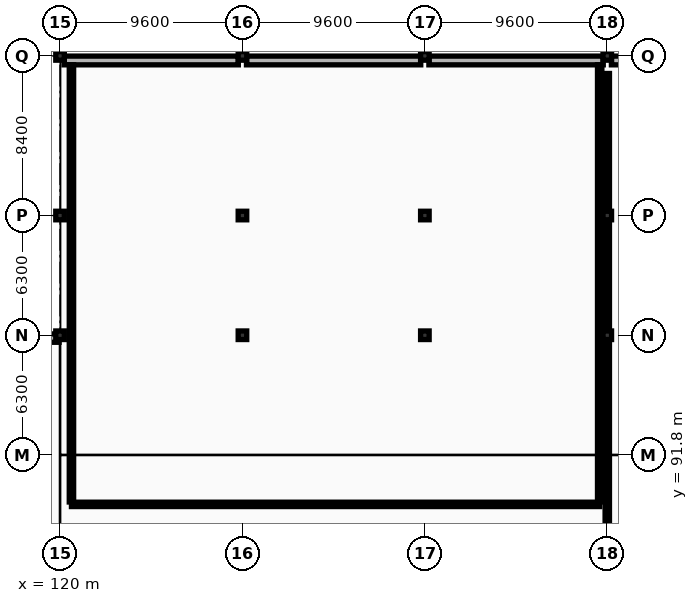
"""IFC4 building model, lengths in metres.
Left out: names, types, materials, properties, quantities, classifications, styles, units other than length and angle.
Written with IfcOpenShell. Run it as: python <this file> out.ifc"""

import sys

from ifc_helpers import new_model, si_unit, direction, frame, frame_2d, origin, origin_2d, place, context, subcontext, project, spatial, rectangle, extrude, element, fill, save


model = new_model("IFC4")
c1 = context("Model", 3, precision=1e-05, world=origin(), true_north=direction((0.0, 1.0)))
c2 = subcontext(c1, "Body", "Model", "MODEL_VIEW")
j1 = project(units=[si_unit("LENGTHUNIT", "METRE"), si_unit("PLANEANGLEUNIT", "RADIAN")], contexts=[c1])
p1 = place(None, origin())
s1 = spatial("IfcSite", under=j1, at=p1, CompositionType="ELEMENT")
p2 = place(p1, origin())
s2 = spatial("IfcBuilding", under=s1, at=p2, CompositionType="ELEMENT")
p3 = place(p2, frame((0.0, 0.0, 5.4)))
s3 = spatial("IfcBuildingStorey", under=s2, at=p3, CompositionType="ELEMENT", Elevation=5.4)
for number, where, z_axis, x_axis in (
    (1, (120.0, 98.1, 0.0), (0.0, 0.0, 1.0), (1.0, 0.0, 0.0)),
    (2, (120.0, 104.4, 0.0), (0.0, 0.0, 1.0), (1.0, 0.0, 0.0)),
    (3, (120.0, 112.8, 0.0), (0.0, 0.0, 1.0), (1.0, 0.0, 0.0)),
    (4, (129.6, 98.1, 0.0), (0.0, 0.0, 1.0), (1.0, 0.0, 0.0)),
    (5, (129.6, 104.4, 0.0), (0.0, 0.0, 1.0), (1.0, 0.0, 0.0)),
    (6, (129.6, 112.8, 0.0), (0.0, 0.0, 1.0), (1.0, 0.0, 0.0)),
    (7, (139.2, 98.1, 0.0), (0.0, 0.0, 1.0), (1.0, 0.0, 0.0)),
    (8, (139.2, 104.4, 0.0), (0.0, 0.0, 1.0), (1.0, 0.0, 0.0)),
    (9, (139.2, 112.8, 0.0), (0.0, 0.0, 1.0), (1.0, 0.0, 0.0)),
    (10, (148.8, 98.1, 0.0), (0.0, 0.0, 1.0), (1.0, 0.0, 0.0)),
    (11, (148.8, 104.4, 0.0), (0.0, 0.0, 1.0), (1.0, 0.0, 0.0)),
    (12, (148.8, 112.8, 0.0), (0.0, 0.0, 1.0), (1.0, 0.0, 0.0)),
):
    element("IfcColumn", number, at=place(p3, frame(where, z_axis=z_axis, x_axis=x_axis)), inside=s3, PredefinedType="COLUMN", context=c2, shape_type="SweptSolid", body=[
        extrude(rectangle(XDim=0.45, YDim=0.45, at=origin_2d()), origin(), (0.0, 0.0, 1.0), 4.5),
    ])
p4 = place(p3, frame((120.212, 112.56, 0.0), z_axis=(0.0, 0.0, 1.0), x_axis=(1.0, 0.0, 0.0)))
e13 = element("IfcWall", 13, at=p4, inside=s3, PredefinedType="STANDARD", context=c2, shape_type="SweptSolid", body=[
    extrude(rectangle(XDim=9.171, YDim=0.46, at=frame_2d((4.585, 0.0))), origin(), (0.0, 0.0, 1.0), 3.72),
])
p5 = place(p4, frame((2.278, 0.0, 2.15)))
e14 = element("IfcOpeningElement", 14, at=p5, cuts=e13, PredefinedType="OPENING", context=c2, shape_type="SweptSolid", body=[
    extrude(rectangle(XDim=0.85, YDim=0.9, at=frame_2d((0.425, 0.45))), frame((0.0, 0.24, 0.0), z_axis=(0.0, -1.0, 0.0), x_axis=(1.0, 0.0, 0.0)), (0.0, 0.0, 1.0), 0.48),
])
p6 = place(p4, frame((6.048, 0.0, 2.15)))
e15 = element("IfcOpeningElement", 15, at=p6, cuts=e13, PredefinedType="OPENING", context=c2, shape_type="SweptSolid", body=[
    extrude(rectangle(XDim=0.85, YDim=0.9, at=frame_2d((0.425, 0.45))), frame((0.0, 0.24, 0.0), z_axis=(0.0, -1.0, 0.0), x_axis=(1.0, 0.0, 0.0)), (0.0, 0.0, 1.0), 0.48),
])
p7 = place(p3, frame((129.812, 112.56, 0.0), z_axis=(0.0, 0.0, 1.0), x_axis=(1.0, 0.0, 0.0)))
e16 = element("IfcWall", 16, at=p7, inside=s3, PredefinedType="STANDARD", context=c2, shape_type="SweptSolid", body=[
    extrude(rectangle(XDim=9.171, YDim=0.46, at=frame_2d((4.585, 0.0))), origin(), (0.0, 0.0, 1.0), 3.72),
])
p8 = place(p7, frame((2.278, 0.0, 2.15)))
e17 = element("IfcOpeningElement", 17, at=p8, cuts=e16, PredefinedType="OPENING", context=c2, shape_type="SweptSolid", body=[
    extrude(rectangle(XDim=0.85, YDim=0.9, at=frame_2d((0.425, 0.45))), frame((0.0, 0.24, 0.0), z_axis=(0.0, -1.0, 0.0), x_axis=(1.0, 0.0, 0.0)), (0.0, 0.0, 1.0), 0.48),
])
p9 = place(p7, frame((6.048, 0.0, 2.15)))
e18 = element("IfcOpeningElement", 18, at=p9, cuts=e16, PredefinedType="OPENING", context=c2, shape_type="SweptSolid", body=[
    extrude(rectangle(XDim=0.85, YDim=0.9, at=frame_2d((0.425, 0.45))), frame((0.0, 0.24, 0.0), z_axis=(0.0, -1.0, 0.0), x_axis=(1.0, 0.0, 0.0)), (0.0, 0.0, 1.0), 0.48),
])
p10 = place(p3, frame((139.412, 112.56, 0.0), z_axis=(0.0, 0.0, 1.0), x_axis=(1.0, 0.0, 0.0)))
e19 = element("IfcWall", 19, at=p10, inside=s3, PredefinedType="STANDARD", context=c2, shape_type="SweptSolid", body=[
    extrude(rectangle(XDim=9.176, YDim=0.46, at=frame_2d((4.588, 0.0))), origin(), (0.0, 0.0, 1.0), 3.72),
])
p11 = place(p10, frame((2.278, 0.0, 2.15)))
e20 = element("IfcOpeningElement", 20, at=p11, cuts=e19, PredefinedType="OPENING", context=c2, shape_type="SweptSolid", body=[
    extrude(rectangle(XDim=0.85, YDim=0.9, at=frame_2d((0.425, 0.45))), frame((0.0, 0.24, 0.0), z_axis=(0.0, -1.0, 0.0), x_axis=(1.0, 0.0, 0.0)), (0.0, 0.0, 1.0), 0.48),
])
p12 = place(p10, frame((6.048, 0.0, 2.15)))
e21 = element("IfcOpeningElement", 21, at=p12, cuts=e19, PredefinedType="OPENING", context=c2, shape_type="SweptSolid", body=[
    extrude(rectangle(XDim=0.85, YDim=0.9, at=frame_2d((0.425, 0.45))), frame((0.0, 0.24, 0.0), z_axis=(0.0, -1.0, 0.0), x_axis=(1.0, 0.0, 0.0)), (0.0, 0.0, 1.0), 0.48),
])
p13 = place(p3, frame((149.017, 112.56, 0.0), z_axis=(0.0, 0.0, 1.0), x_axis=(1.0, 0.0, 0.0)))
e22 = element("IfcWall", 22, at=p13, inside=s3, PredefinedType="STANDARD", context=c2, shape_type="SweptSolid", body=[
    extrude(rectangle(XDim=12.766, YDim=0.46, at=frame_2d((6.383, 0.0))), origin(), (0.0, 0.0, 1.0), 3.72),
])
p14 = place(p13, frame((3.173, 0.0, 2.15)))
e23 = element("IfcOpeningElement", 23, at=p14, cuts=e22, PredefinedType="OPENING", context=c2, shape_type="SweptSolid", body=[
    extrude(rectangle(XDim=0.85, YDim=0.9, at=frame_2d((0.425, 0.45))), frame((0.0, 0.24, 0.0), z_axis=(0.0, -1.0, 0.0), x_axis=(1.0, 0.0, 0.0)), (0.0, 0.0, 1.0), 0.48),
])
p15 = place(p13, frame((8.743, 0.0, 2.15)))
e24 = element("IfcOpeningElement", 24, at=p15, cuts=e22, PredefinedType="OPENING", context=c2, shape_type="SweptSolid", body=[
    extrude(rectangle(XDim=0.85, YDim=0.9, at=frame_2d((0.425, 0.45))), frame((0.0, 0.24, 0.0), z_axis=(0.0, -1.0, 0.0), x_axis=(1.0, 0.0, 0.0)), (0.0, 0.0, 1.0), 0.48),
])
p16 = place(p3, frame((112.85, 97.95, 0.0), z_axis=(0.0, 0.0, 1.0), x_axis=(1.0, 0.0, 0.0)))
e25 = element("IfcWall", 25, at=p16, inside=s3, PredefinedType="STANDARD", context=c2, shape_type="SweptSolid", body=[
    extrude(rectangle(XDim=7.1, YDim=0.44, at=frame_2d((3.55, 0.0))), origin(), (0.0, 0.0, 1.0), 3.37),
])
p17 = place(p3, frame((148.8, 67.925, 0.0), z_axis=(0.0, 0.0, 1.0), x_axis=(0.0, 1.0, 0.0)))
e26 = element("IfcWall", 26, at=p17, inside=s3, PredefinedType="STANDARD", context=c2, shape_type="SweptSolid", body=[
    extrude(rectangle(XDim=43.95, YDim=0.23, at=frame_2d((21.975, 0.0))), origin(), (0.0, 0.0, 1.0), 3.37),
])
p18 = place(p17, frame((2.46, 0.0, 0.0)))
e27 = element("IfcOpeningElement", 27, at=p18, cuts=e26, PredefinedType="OPENING", context=c2, shape_type="SweptSolid", body=[
    extrude(rectangle(XDim=1.05, YDim=2.15, at=frame_2d((0.525, 1.075))), frame((0.0, 0.125, 0.0), z_axis=(0.0, -1.0, 0.0), x_axis=(1.0, 0.0, 0.0)), (0.0, 0.0, 1.0), 0.25),
])
p19 = place(p3, frame((148.4, 89.2, 0.0), z_axis=(0.0, 0.0, 1.0), x_axis=(-1.0, 0.0, 0.0)))
e28 = element("IfcWall", 28, at=p19, inside=s3, PredefinedType="STANDARD", context=c2, shape_type="SweptSolid", body=[
    extrude(rectangle(XDim=27.8, YDim=0.23, at=frame_2d((13.9, 0.0))), origin(), (0.0, 0.0, 1.0), 3.37),
])
p20 = place(p19, frame((2.955, 0.0, 0.0)))
e29 = element("IfcOpeningElement", 29, at=p20, cuts=e28, PredefinedType="OPENING", context=c2, shape_type="SweptSolid", body=[
    extrude(rectangle(XDim=1.05, YDim=2.15, at=frame_2d((0.525, 1.075))), frame((0.0, 0.125, 0.0), z_axis=(0.0, -1.0, 0.0), x_axis=(1.0, 0.0, 0.0)), (0.0, 0.0, 1.0), 0.25),
])
p21 = place(p3, frame((120.6, 89.325, 0.0), z_axis=(0.0, 0.0, 1.0), x_axis=(0.0, 1.0, 0.0)))
e30 = element("IfcWall", 30, at=p21, inside=s3, PredefinedType="STANDARD", context=c2, shape_type="SweptSolid", body=[
    extrude(rectangle(XDim=23.011, YDim=0.23, at=frame_2d((11.505, 0.0))), origin(), (0.0, 0.0, 1.0), 3.47),
])
p22 = place(p3, frame((148.4, 112.336, 0.0), z_axis=(0.0, 0.0, 1.0), x_axis=(0.0, -1.0, 0.0)))
e31 = element("IfcWall", 31, at=p22, inside=s3, PredefinedType="STANDARD", context=c2, shape_type="SweptSolid", body=[
    extrude(rectangle(XDim=23.011, YDim=0.23, at=frame_2d((11.505, 0.0))), origin(), (0.0, 0.0, 1.0), 3.37),
])
p23 = place(p5, origin())
e32 = element("IfcWindow", 32, at=p23, inside=s3, PartitioningType="SINGLE_PANEL", PredefinedType="WINDOW", context=c2, shape_type="SweptSolid", body=[
    extrude(rectangle(XDim=0.85, YDim=0.9, at=frame_2d((0.425, 0.45))), frame((0.0, 0.03, 0.0), z_axis=(0.0, -1.0, 0.0), x_axis=(1.0, 0.0, 0.0)), (0.0, 0.0, 1.0), 0.06),
])
fill(e14, e32)
p24 = place(p6, origin())
e33 = element("IfcWindow", 33, at=p24, inside=s3, PartitioningType="SINGLE_PANEL", PredefinedType="WINDOW", context=c2, shape_type="SweptSolid", body=[
    extrude(rectangle(XDim=0.85, YDim=0.9, at=frame_2d((0.425, 0.45))), frame((0.0, 0.03, 0.0), z_axis=(0.0, -1.0, 0.0), x_axis=(1.0, 0.0, 0.0)), (0.0, 0.0, 1.0), 0.06),
])
fill(e15, e33)
p25 = place(p8, origin())
e34 = element("IfcWindow", 34, at=p25, inside=s3, PartitioningType="SINGLE_PANEL", PredefinedType="WINDOW", context=c2, shape_type="SweptSolid", body=[
    extrude(rectangle(XDim=0.85, YDim=0.9, at=frame_2d((0.425, 0.45))), frame((0.0, 0.03, 0.0), z_axis=(0.0, -1.0, 0.0), x_axis=(1.0, 0.0, 0.0)), (0.0, 0.0, 1.0), 0.06),
])
fill(e17, e34)
p26 = place(p9, origin())
e35 = element("IfcWindow", 35, at=p26, inside=s3, PartitioningType="SINGLE_PANEL", PredefinedType="WINDOW", context=c2, shape_type="SweptSolid", body=[
    extrude(rectangle(XDim=0.85, YDim=0.9, at=frame_2d((0.425, 0.45))), frame((0.0, 0.03, 0.0), z_axis=(0.0, -1.0, 0.0), x_axis=(1.0, 0.0, 0.0)), (0.0, 0.0, 1.0), 0.06),
])
fill(e18, e35)
p27 = place(p11, origin())
e36 = element("IfcWindow", 36, at=p27, inside=s3, PartitioningType="SINGLE_PANEL", PredefinedType="WINDOW", context=c2, shape_type="SweptSolid", body=[
    extrude(rectangle(XDim=0.85, YDim=0.9, at=frame_2d((0.425, 0.45))), frame((0.0, 0.03, 0.0), z_axis=(0.0, -1.0, 0.0), x_axis=(1.0, 0.0, 0.0)), (0.0, 0.0, 1.0), 0.06),
])
fill(e20, e36)
p28 = place(p12, origin())
e37 = element("IfcWindow", 37, at=p28, inside=s3, PartitioningType="SINGLE_PANEL", PredefinedType="WINDOW", context=c2, shape_type="SweptSolid", body=[
    extrude(rectangle(XDim=0.85, YDim=0.9, at=frame_2d((0.425, 0.45))), frame((0.0, 0.03, 0.0), z_axis=(0.0, -1.0, 0.0), x_axis=(1.0, 0.0, 0.0)), (0.0, 0.0, 1.0), 0.06),
])
fill(e21, e37)
p29 = place(p20, origin())
e38 = element("IfcDoor", 38, at=p29, inside=s3, OperationType="SINGLE_SWING_LEFT", PredefinedType="DOOR", context=c2, shape_type="SweptSolid", body=[
    extrude(rectangle(XDim=1.05, YDim=2.15, at=frame_2d((0.525, 1.075))), frame((0.0, 0.025, 0.0), z_axis=(0.0, -1.0, 0.0), x_axis=(1.0, 0.0, 0.0)), (0.0, 0.0, 1.0), 0.05),
])
fill(e29, e38)
save(model, sys.argv[1])
